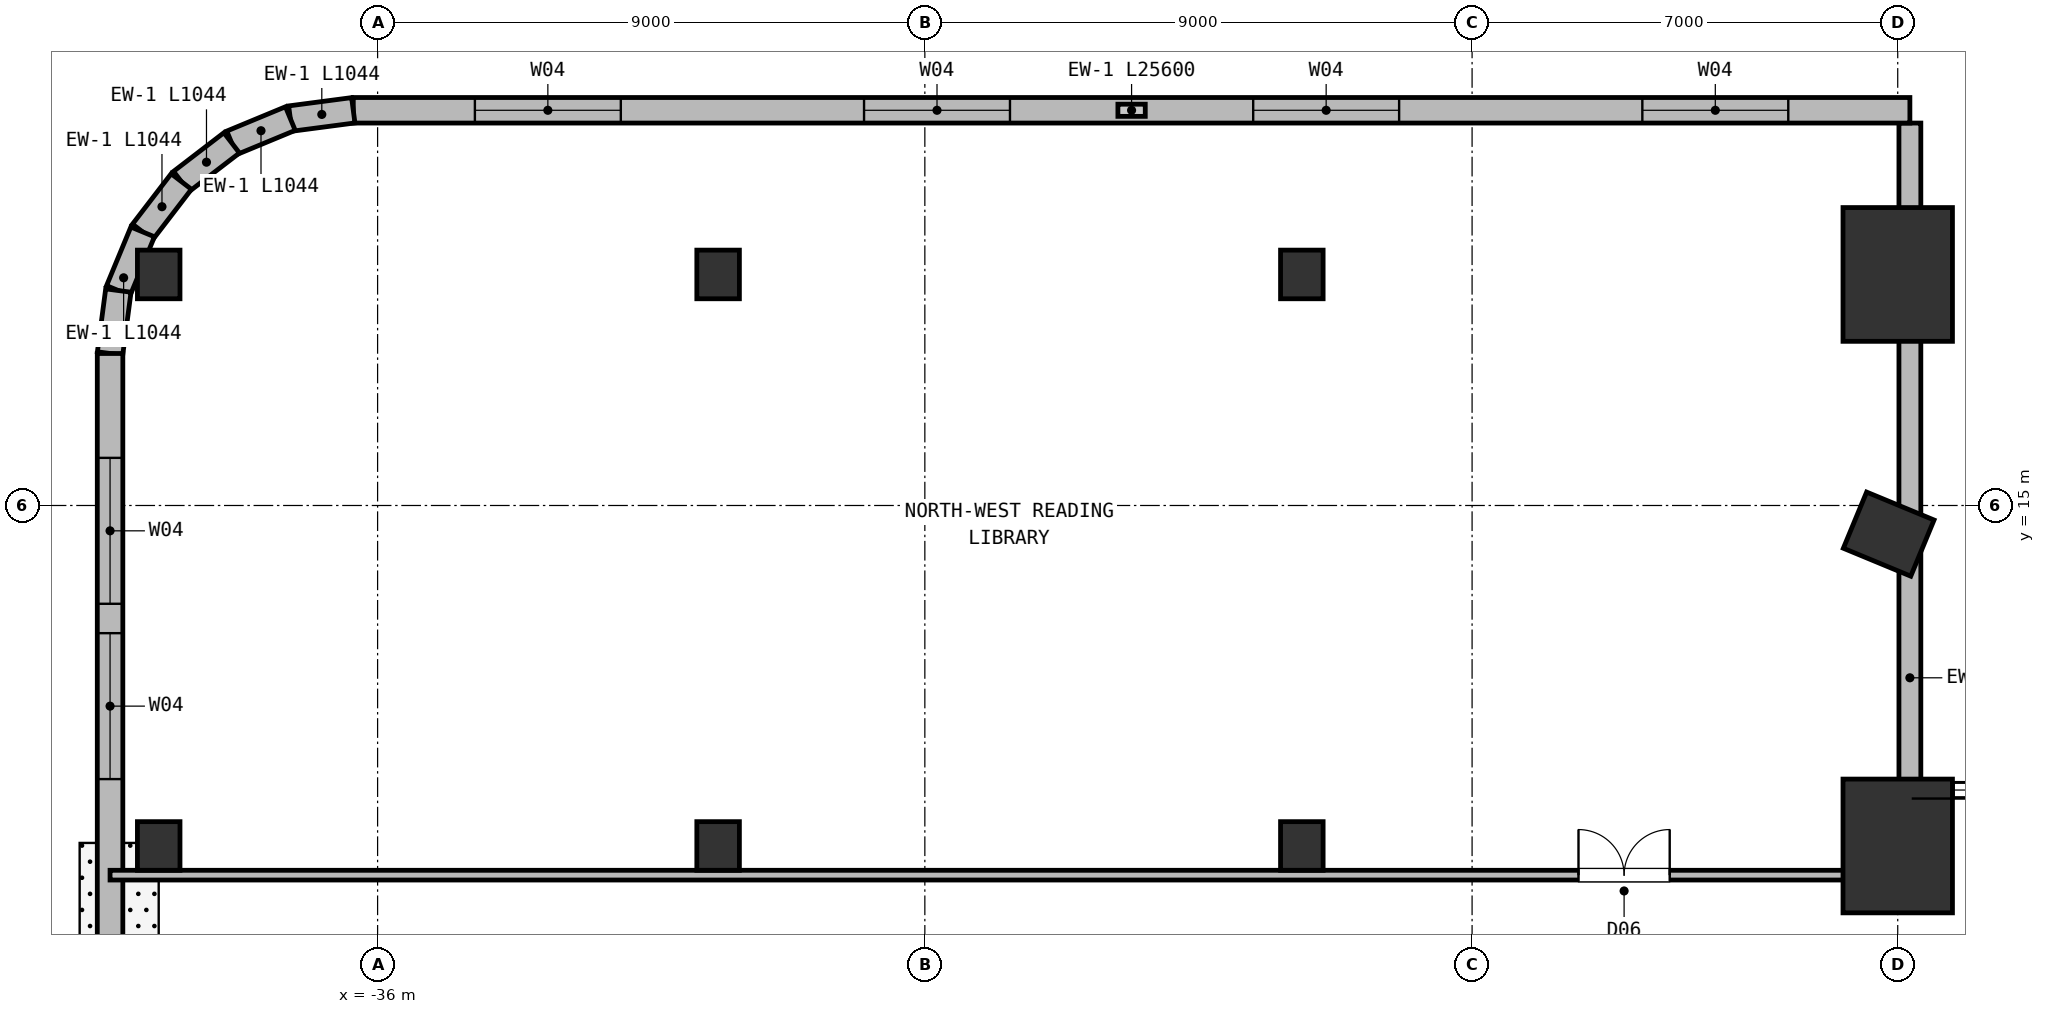
"""IFC4 building model, lengths in metres.
Left out: names, types, materials, properties, quantities, classifications, styles, units other than length and angle.
Written with IfcOpenShell. Run it as: python <this file> out.ifc"""

import sys

from ifc_helpers import new_model, si_unit, direction, frame, frame_2d, origin, origin_2d, place, context, subcontext, project, spatial, rectangle, extrude, element, fill, save


model = new_model("IFC4")
c1 = context("Model", 3, precision=1e-05, world=origin(), true_north=direction((0.0, 1.0)))
c2 = subcontext(c1, "Body", "Model", "MODEL_VIEW")
j1 = project(units=[si_unit("LENGTHUNIT", "METRE"), si_unit("PLANEANGLEUNIT", "RADIAN")], contexts=[c1])
p1 = place(None, origin())
s1 = spatial("IfcSite", under=j1, at=p1, CompositionType="ELEMENT")
p2 = place(p1, origin())
s2 = spatial("IfcBuilding", under=s1, at=p2, CompositionType="ELEMENT")
p3 = place(p2, frame((0.0, 0.0, 6.0)))
s3 = spatial("IfcBuildingStorey", under=s2, at=p3, CompositionType="ELEMENT", Elevation=6.0)
p4 = place(p3, frame((-11.148, 14.529, 0.0), z_axis=(0.0, 0.0, 1.0), x_axis=(0.382683432365, 0.923879532511, 0.0)))
e1 = element("IfcColumn", 1, at=p4, inside=s3, PredefinedType="COLUMN", context=c2, shape_type="SweptSolid", body=[
    extrude(rectangle(XDim=1.0, YDim=1.2, at=origin_2d()), origin(), (0.0, 0.0, 1.0), 5.0),
])
for number, where, z_axis, x_axis in (
    (2, (-39.6, 9.4, 0.0), (0.0, 0.0, 1.0), (1.0, 0.0, 0.0)),
    (3, (-39.6, 18.8, 0.0), (0.0, 0.0, 1.0), (1.0, 0.0, 0.0)),
    (4, (-30.4, 9.4, 0.0), (0.0, 0.0, 1.0), (1.0, 0.0, 0.0)),
    (5, (-30.4, 18.8, 0.0), (0.0, 0.0, 1.0), (1.0, 0.0, 0.0)),
    (6, (-20.8, 9.4, 0.0), (0.0, 0.0, 1.0), (1.0, 0.0, 0.0)),
    (7, (-20.8, 18.8, 0.0), (0.0, 0.0, 1.0), (1.0, 0.0, 0.0)),
):
    element("IfcColumn", number, at=place(p3, frame(where, z_axis=z_axis, x_axis=x_axis)), inside=s3, PredefinedType="COLUMN", context=c2, shape_type="SweptSolid", body=[
        extrude(rectangle(XDim=0.7, YDim=0.8, at=origin_2d()), origin(), (0.0, 0.0, 1.0), 5.0),
    ])
for number, where, z_axis, x_axis in (
    (8, (-11.0, 9.4, 0.0), (0.0, 0.0, 1.0), (1.0, 0.0, 0.0)),
    (9, (-11.0, 18.8, 0.0), (0.0, 0.0, 1.0), (1.0, 0.0, 0.0)),
):
    element("IfcColumn", number, at=place(p3, frame(where, z_axis=z_axis, x_axis=x_axis)), inside=s3, PredefinedType="COLUMN", context=c2, shape_type="SweptSolid", body=[
        extrude(rectangle(XDim=1.8, YDim=2.2, at=origin_2d()), origin(), (0.0, 0.0, 1.0), 5.0),
    ])
p5 = place(p3, frame((-10.8, 10.32, 0.0), z_axis=(0.0, 0.0, 1.0), x_axis=(0.0, 1.0, 0.0)))
e10 = element("IfcWall", 10, at=p5, inside=s3, PredefinedType="SOLIDWALL", context=c2, shape_type="SweptSolid", body=[
    extrude(rectangle(XDim=10.97, YDim=0.36, at=frame_2d((5.485, 0.0))), origin(), (0.0, 0.0, 1.0), 4.1),
])
p6 = place(p3, frame((-36.4, 21.5, 0.0), z_axis=(0.0, 0.0, 1.0), x_axis=(1.0, 0.0, 0.0)))
e11 = element("IfcWall", 11, at=p6, inside=s3, PredefinedType="SOLIDWALL", context=c2, shape_type="SweptSolid", body=[
    extrude(rectangle(XDim=25.6, YDim=0.42, at=frame_2d((12.8, 0.0))), origin(), (0.0, 0.0, 1.0), 4.72),
])
p7 = place(p6, frame((2.0, 0.0, 0.95)))
e12 = element("IfcOpeningElement", 12, at=p7, cuts=e11, PredefinedType="OPENING", context=c2, shape_type="SweptSolid", body=[
    extrude(rectangle(XDim=2.4, YDim=2.6, at=frame_2d((1.2, 1.3))), frame((0.0, 0.22, 0.0), z_axis=(0.0, -1.0, 0.0), x_axis=(1.0, 0.0, 0.0)), (0.0, 0.0, 1.0), 0.44),
])
p8 = place(p6, frame((8.4, 0.0, 0.95)))
e13 = element("IfcOpeningElement", 13, at=p8, cuts=e11, PredefinedType="OPENING", context=c2, shape_type="SweptSolid", body=[
    extrude(rectangle(XDim=2.4, YDim=2.6, at=frame_2d((1.2, 1.3))), frame((0.0, 0.22, 0.0), z_axis=(0.0, -1.0, 0.0), x_axis=(1.0, 0.0, 0.0)), (0.0, 0.0, 1.0), 0.44),
])
p9 = place(p6, frame((14.8, 0.0, 0.95)))
e14 = element("IfcOpeningElement", 14, at=p9, cuts=e11, PredefinedType="OPENING", context=c2, shape_type="SweptSolid", body=[
    extrude(rectangle(XDim=2.4, YDim=2.6, at=frame_2d((1.2, 1.3))), frame((0.0, 0.22, 0.0), z_axis=(0.0, -1.0, 0.0), x_axis=(1.0, 0.0, 0.0)), (0.0, 0.0, 1.0), 0.44),
])
p10 = place(p6, frame((21.2, 0.0, 0.95)))
e15 = element("IfcOpeningElement", 15, at=p10, cuts=e11, PredefinedType="OPENING", context=c2, shape_type="SweptSolid", body=[
    extrude(rectangle(XDim=2.4, YDim=2.6, at=frame_2d((1.2, 1.3))), frame((0.0, 0.22, 0.0), z_axis=(0.0, -1.0, 0.0), x_axis=(1.0, 0.0, 0.0)), (0.0, 0.0, 1.0), 0.44),
])
p11 = place(p3, frame((-37.435, 21.364, 0.0), z_axis=(0.0, 0.0, 1.0), x_axis=(0.991455091231, 0.130448465198, 0.0)))
e16 = element("IfcWall", 16, at=p11, inside=s3, PredefinedType="SOLIDWALL", context=c2, shape_type="SweptSolid", body=[
    extrude(rectangle(XDim=1.044, YDim=0.42, at=frame_2d((0.522, 0.0))), origin(), (0.0, 0.0, 1.0), 4.72),
])
p12 = place(p3, frame((-38.4, 20.964, 0.0), z_axis=(0.0, 0.0, 1.0), x_axis=(0.923842970528, 0.382771688877, 0.0)))
e17 = element("IfcWall", 17, at=p12, inside=s3, PredefinedType="SOLIDWALL", context=c2, shape_type="SweptSolid", body=[
    extrude(rectangle(XDim=1.044, YDim=0.42, at=frame_2d((0.522, 0.0))), origin(), (0.0, 0.0, 1.0), 4.72),
])
p13 = place(p3, frame((-39.229, 20.328, 0.0), z_axis=(0.0, 0.0, 1.0), x_axis=(0.793388088797, 0.608716141198, 0.0)))
e18 = element("IfcWall", 18, at=p13, inside=s3, PredefinedType="SOLIDWALL", context=c2, shape_type="SweptSolid", body=[
    extrude(rectangle(XDim=1.044, YDim=0.42, at=frame_2d((0.522, 0.0))), origin(), (0.0, 0.0, 1.0), 4.72),
])
p14 = place(p3, frame((-39.864, 19.5, 0.0), z_axis=(0.0, 0.0, 1.0), x_axis=(0.608681879412, 0.793414374508, 0.0)))
e19 = element("IfcWall", 19, at=p14, inside=s3, PredefinedType="SOLIDWALL", context=c2, shape_type="SweptSolid", body=[
    extrude(rectangle(XDim=1.044, YDim=0.42, at=frame_2d((0.522, 0.0))), origin(), (0.0, 0.0, 1.0), 4.72),
])
p15 = place(p3, frame((-40.264, 18.535, 0.0), z_axis=(0.0, 0.0, 1.0), x_axis=(0.382771688877, 0.923842970528, 0.0)))
e20 = element("IfcWall", 20, at=p15, inside=s3, PredefinedType="SOLIDWALL", context=c2, shape_type="SweptSolid", body=[
    extrude(rectangle(XDim=1.044, YDim=0.42, at=frame_2d((0.522, 0.0))), origin(), (0.0, 0.0, 1.0), 4.72),
])
p16 = place(p3, frame((-40.4, 17.5, 0.0), z_axis=(0.0, 0.0, 1.0), x_axis=(0.130448465198, 0.991455091231, 0.0)))
e21 = element("IfcWall", 21, at=p16, inside=s3, PredefinedType="SOLIDWALL", context=c2, shape_type="SweptSolid", body=[
    extrude(rectangle(XDim=1.044, YDim=0.42, at=frame_2d((0.522, 0.0))), origin(), (0.0, 0.0, 1.0), 4.72),
])
p17 = place(p3, frame((-40.4, -17.5, 0.0), z_axis=(0.0, 0.0, 1.0), x_axis=(0.0, 1.0, 0.0)))
e22 = element("IfcWall", 22, at=p17, inside=s3, PredefinedType="SOLIDWALL", context=c2, shape_type="SweptSolid", body=[
    extrude(rectangle(XDim=35.0, YDim=0.42, at=frame_2d((17.5, 0.0))), origin(), (0.0, 0.0, 1.0), 4.72),
])
p18 = place(p17, frame((1.717, 0.0, 0.95)))
e23 = element("IfcOpeningElement", 23, at=p18, cuts=e22, PredefinedType="OPENING", context=c2, shape_type="SweptSolid", body=[
    extrude(rectangle(XDim=2.4, YDim=2.6, at=frame_2d((1.2, 1.3))), frame((0.0, 0.22, 0.0), z_axis=(0.0, -1.0, 0.0), x_axis=(1.0, 0.0, 0.0)), (0.0, 0.0, 1.0), 0.44),
])
p19 = place(p17, frame((4.6, 0.0, 0.95)))
e24 = element("IfcOpeningElement", 24, at=p19, cuts=e22, PredefinedType="OPENING", context=c2, shape_type="SweptSolid", body=[
    extrude(rectangle(XDim=2.4, YDim=2.6, at=frame_2d((1.2, 1.3))), frame((0.0, 0.22, 0.0), z_axis=(0.0, -1.0, 0.0), x_axis=(1.0, 0.0, 0.0)), (0.0, 0.0, 1.0), 0.44),
])
p20 = place(p17, frame((13.383, 0.0, 0.95)))
e25 = element("IfcOpeningElement", 25, at=p20, cuts=e22, PredefinedType="OPENING", context=c2, shape_type="SweptSolid", body=[
    extrude(rectangle(XDim=2.4, YDim=2.6, at=frame_2d((1.2, 1.3))), frame((0.0, 0.22, 0.0), z_axis=(0.0, -1.0, 0.0), x_axis=(1.0, 0.0, 0.0)), (0.0, 0.0, 1.0), 0.44),
])
p21 = place(p17, frame((19.217, 0.0, 0.95)))
e26 = element("IfcOpeningElement", 26, at=p21, cuts=e22, PredefinedType="OPENING", context=c2, shape_type="SweptSolid", body=[
    extrude(rectangle(XDim=2.4, YDim=2.6, at=frame_2d((1.2, 1.3))), frame((0.0, 0.22, 0.0), z_axis=(0.0, -1.0, 0.0), x_axis=(1.0, 0.0, 0.0)), (0.0, 0.0, 1.0), 0.44),
])
p22 = place(p17, frame((28.0, 0.0, 0.95)))
e27 = element("IfcOpeningElement", 27, at=p22, cuts=e22, PredefinedType="OPENING", context=c2, shape_type="SweptSolid", body=[
    extrude(rectangle(XDim=2.4, YDim=2.6, at=frame_2d((1.2, 1.3))), frame((0.0, 0.22, 0.0), z_axis=(0.0, -1.0, 0.0), x_axis=(1.0, 0.0, 0.0)), (0.0, 0.0, 1.0), 0.44),
])
p23 = place(p17, frame((30.883, 0.0, 0.95)))
e28 = element("IfcOpeningElement", 28, at=p23, cuts=e22, PredefinedType="OPENING", context=c2, shape_type="SweptSolid", body=[
    extrude(rectangle(XDim=2.4, YDim=2.6, at=frame_2d((1.2, 1.3))), frame((0.0, 0.22, 0.0), z_axis=(0.0, -1.0, 0.0), x_axis=(1.0, 0.0, 0.0)), (0.0, 0.0, 1.0), 0.44),
])
p24 = place(p3, frame((-40.4, 8.92, 0.0), z_axis=(0.0, 0.0, 1.0), x_axis=(1.0, 0.0, 0.0)))
e29 = element("IfcWall", 29, at=p24, inside=s3, PredefinedType="PARTITIONING", context=c2, shape_type="SweptSolid", body=[
    extrude(rectangle(XDim=29.55, YDim=0.16, at=frame_2d((14.775, 0.0))), origin(), (0.0, 0.0, 1.0), 4.72),
])
p25 = place(p24, frame((24.15, 0.0, 0.0)))
e30 = element("IfcOpeningElement", 30, at=p25, cuts=e29, PredefinedType="OPENING", context=c2, shape_type="SweptSolid", body=[
    extrude(rectangle(XDim=1.5, YDim=2.2, at=frame_2d((0.75, 1.1))), frame((0.0, 0.09, 0.0), z_axis=(0.0, -1.0, 0.0), x_axis=(1.0, 0.0, 0.0)), (0.0, 0.0, 1.0), 0.18),
])
p26 = place(p7, origin())
e31 = element("IfcWindow", 31, at=p26, inside=s3, PartitioningType="SINGLE_PANEL", PredefinedType="WINDOW", context=c2, shape_type="SweptSolid", body=[
    extrude(rectangle(XDim=2.4, YDim=2.6, at=frame_2d((1.2, 1.3))), frame((0.0, 0.03, 0.0), z_axis=(0.0, -1.0, 0.0), x_axis=(1.0, 0.0, 0.0)), (0.0, 0.0, 1.0), 0.06),
])
fill(e12, e31)
p27 = place(p8, origin())
e32 = element("IfcWindow", 32, at=p27, inside=s3, PartitioningType="SINGLE_PANEL", PredefinedType="WINDOW", context=c2, shape_type="SweptSolid", body=[
    extrude(rectangle(XDim=2.4, YDim=2.6, at=frame_2d((1.2, 1.3))), frame((0.0, 0.03, 0.0), z_axis=(0.0, -1.0, 0.0), x_axis=(1.0, 0.0, 0.0)), (0.0, 0.0, 1.0), 0.06),
])
fill(e13, e32)
p28 = place(p9, origin())
e33 = element("IfcWindow", 33, at=p28, inside=s3, PartitioningType="SINGLE_PANEL", PredefinedType="WINDOW", context=c2, shape_type="SweptSolid", body=[
    extrude(rectangle(XDim=2.4, YDim=2.6, at=frame_2d((1.2, 1.3))), frame((0.0, 0.03, 0.0), z_axis=(0.0, -1.0, 0.0), x_axis=(1.0, 0.0, 0.0)), (0.0, 0.0, 1.0), 0.06),
])
fill(e14, e33)
p29 = place(p10, origin())
e34 = element("IfcWindow", 34, at=p29, inside=s3, PartitioningType="SINGLE_PANEL", PredefinedType="WINDOW", context=c2, shape_type="SweptSolid", body=[
    extrude(rectangle(XDim=2.4, YDim=2.6, at=frame_2d((1.2, 1.3))), frame((0.0, 0.03, 0.0), z_axis=(0.0, -1.0, 0.0), x_axis=(1.0, 0.0, 0.0)), (0.0, 0.0, 1.0), 0.06),
])
fill(e15, e34)
p30 = place(p22, origin())
e35 = element("IfcWindow", 35, at=p30, inside=s3, PartitioningType="SINGLE_PANEL", PredefinedType="WINDOW", context=c2, shape_type="SweptSolid", body=[
    extrude(rectangle(XDim=2.4, YDim=2.6, at=frame_2d((1.2, 1.3))), frame((0.0, 0.03, 0.0), z_axis=(0.0, -1.0, 0.0), x_axis=(1.0, 0.0, 0.0)), (0.0, 0.0, 1.0), 0.06),
])
fill(e27, e35)
p31 = place(p23, origin())
e36 = element("IfcWindow", 36, at=p31, inside=s3, PartitioningType="SINGLE_PANEL", PredefinedType="WINDOW", context=c2, shape_type="SweptSolid", body=[
    extrude(rectangle(XDim=2.4, YDim=2.6, at=frame_2d((1.2, 1.3))), frame((0.0, 0.03, 0.0), z_axis=(0.0, -1.0, 0.0), x_axis=(1.0, 0.0, 0.0)), (0.0, 0.0, 1.0), 0.06),
])
fill(e28, e36)
p32 = place(p25, origin())
e37 = element("IfcDoor", 37, at=p32, inside=s3, OperationType="DOUBLE_DOOR_SINGLE_SWING", PredefinedType="DOOR", context=c2, shape_type="SweptSolid", body=[
    extrude(rectangle(XDim=1.5, YDim=2.2, at=frame_2d((0.75, 1.1))), frame((0.0, 0.025, 0.0), z_axis=(0.0, -1.0, 0.0), x_axis=(1.0, 0.0, 0.0)), (0.0, 0.0, 1.0), 0.05),
])
fill(e30, e37)
save(model, sys.argv[1])
